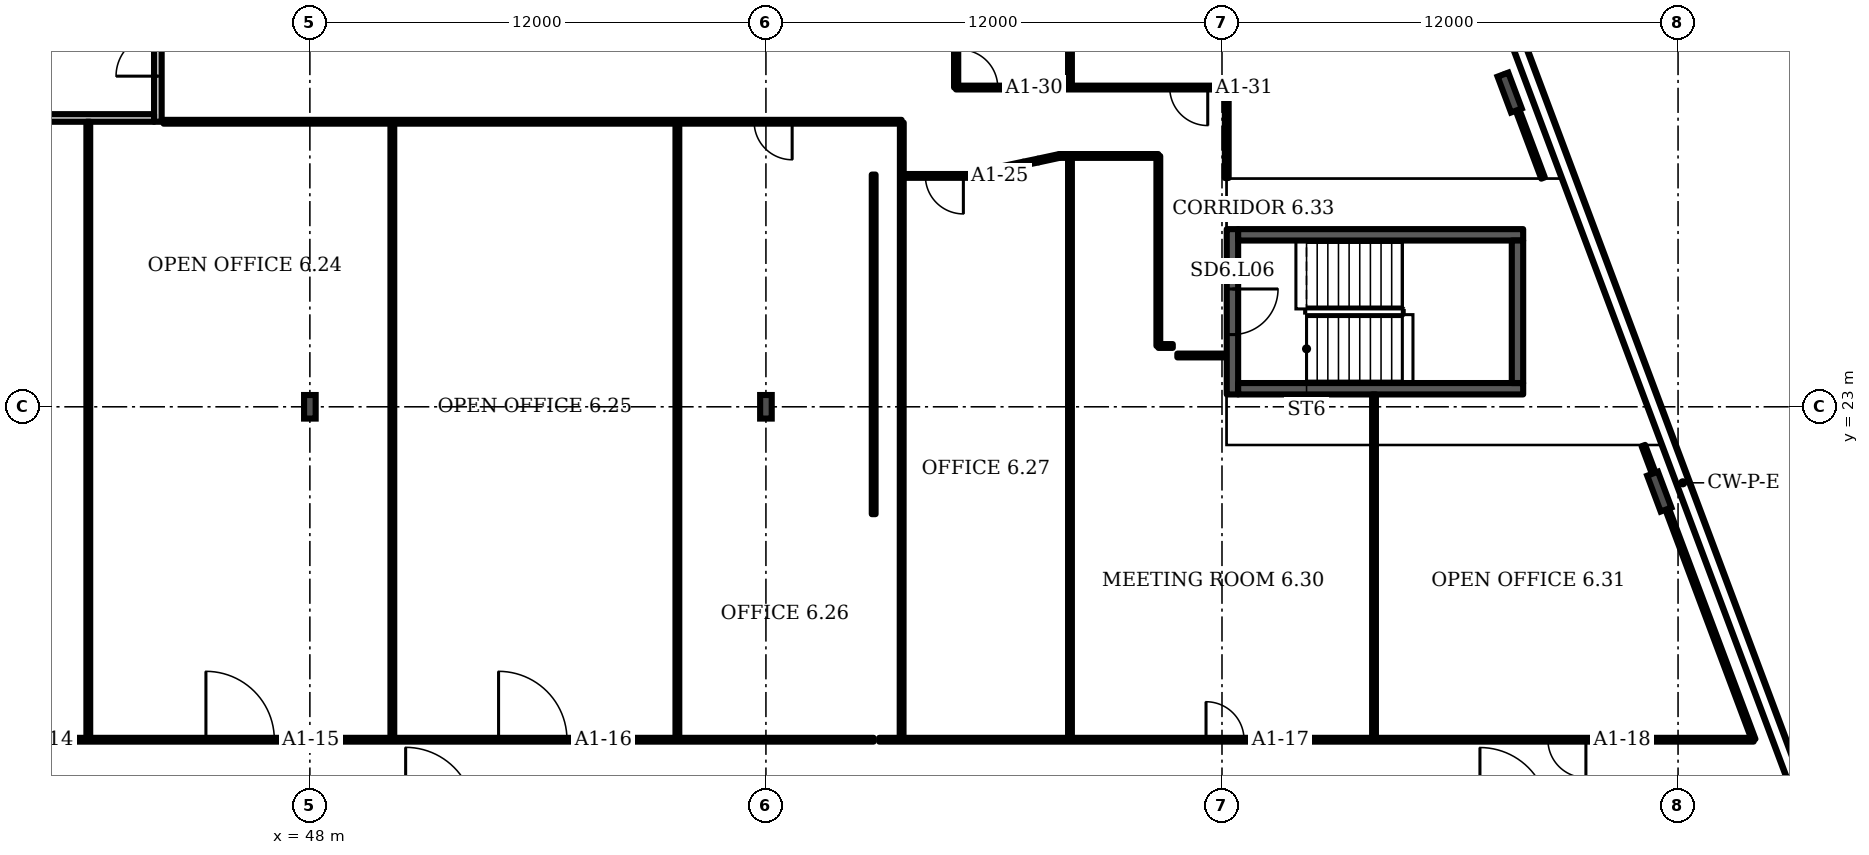
"""IFC4 building model, lengths in metres.
Left out: names, types, materials, properties, quantities, classifications, styles, units other than length and angle.
Written with IfcOpenShell. Run it as: python <this file> out.ifc"""

import sys

from ifc_helpers import new_model, si_unit, direction, frame, frame_2d, origin, origin_2d, place, context, subcontext, project, spatial, rectangle, i_section, extrude, element, fill, save


model = new_model("IFC4")
c1 = context("Model", 3, precision=1e-05, world=origin(), true_north=direction((0.0, 1.0)))
c2 = subcontext(c1, "Body", "Model", "MODEL_VIEW")
j1 = project(units=[si_unit("LENGTHUNIT", "METRE"), si_unit("PLANEANGLEUNIT", "RADIAN")], contexts=[c1])
p1 = place(None, origin())
s1 = spatial("IfcSite", under=j1, at=p1, CompositionType="ELEMENT")
p2 = place(p1, origin())
s2 = spatial("IfcBuilding", under=s1, at=p2, CompositionType="ELEMENT")
p3 = place(p2, frame((0.0, 0.0, 41.5)))
s3 = spatial("IfcBuildingStorey", under=s2, at=p3, CompositionType="ELEMENT", Elevation=41.5)
for number, where, z_axis, x_axis in (
    (1, (83.507, 20.768, 0.0), (0.0, 0.0, 1.0), (0.936, 0.351, 0.0)),
    (2, (79.57, 31.268, 0.0), (0.0, 0.0, 1.0), (0.936, 0.351, 0.0)),
):
    element("IfcColumn", number, at=place(p3, frame(where, z_axis=z_axis, x_axis=x_axis)), inside=s3, PredefinedType="COLUMN", context=c2, shape_type="SweptSolid", body=[
        extrude(i_section(OverallWidth=0.302, OverallDepth=1.008, WebThickness=0.021, FlangeThickness=0.04, FilletRadius=0.03, at=origin_2d()), origin(), (0.0, 0.0, 1.0), 3.6),
    ])
for number, where, z_axis, x_axis in (
    (3, (48.0, 23.0, 0.0), (0.0, 0.0, 1.0), (1.0, 0.0, 0.0)),
    (4, (60.0, 23.0, 0.0), (0.0, 0.0, 1.0), (1.0, 0.0, 0.0)),
):
    element("IfcColumn", number, at=place(p3, frame(where, z_axis=z_axis, x_axis=x_axis)), inside=s3, PredefinedType="COLUMN", context=c2, shape_type="SweptSolid", body=[
        extrude(i_section(OverallWidth=0.305, OverallDepth=0.62, WebThickness=0.021, FlangeThickness=0.04, FilletRadius=0.027, at=origin_2d()), origin(), (0.0, 0.0, 1.0), 3.6),
    ])
p4 = place(p3, frame((91.926, 0.211, 0.0), z_axis=(0.0, 0.0, 1.0), x_axis=(-0.351119, 0.93633, 0.0)))
e5 = element("IfcWall", 5, at=p4, inside=s3, PredefinedType="SOLIDWALL", context=c2, shape_type="SweptSolid", body=[
    extrude(rectangle(XDim=44.757, YDim=0.35, at=frame_2d((22.378, 0.0))), origin(), (0.0, 0.0, 1.0), 1.0),
])
p5 = place(p3, frame((44.0, 30.5, 0.0), z_axis=(0.0, 0.0, 1.0), x_axis=(0.0, 1.0, 0.0)))
e6 = element("IfcWall", 6, at=p5, inside=s3, PredefinedType="PARTITIONING", context=c2, shape_type="SweptSolid", body=[
    extrude(rectangle(XDim=3.5, YDim=0.2, at=frame_2d((1.75, 0.0))), origin(), (0.0, 0.0, 1.0), 3.2),
])
p6 = place(p5, frame((1.2, 0.0, 0.0)))
e7 = element("IfcOpeningElement", 7, at=p6, cuts=e6, PredefinedType="OPENING", context=c2, shape_type="SweptSolid", body=[
    extrude(rectangle(XDim=1.1, YDim=2.1, at=frame_2d((0.55, 1.05))), frame((0.0, 0.11, 0.0), z_axis=(0.0, -1.0, 0.0), x_axis=(1.0, 0.0, 0.0)), (0.0, 0.0, 1.0), 0.22),
])
p7 = place(p3, frame((41.1, 30.6, 0.0), z_axis=(0.0, 0.0, 1.0), x_axis=(1.0, 0.0, 0.0)))
e8 = element("IfcWall", 8, at=p7, inside=s3, PredefinedType="PARTITIONING", context=c2, shape_type="SweptSolid", body=[
    extrude(rectangle(XDim=2.8, YDim=0.2, at=frame_2d((1.4, 0.0))), origin(), (0.0, 0.0, 1.0), 3.2),
])
p8 = place(p3, frame((72.275, 23.325, 0.0), z_axis=(0.0, 0.0, 1.0), x_axis=(0.0, 1.0, 0.0)))
e9 = element("IfcWall", 9, at=p8, inside=s3, PredefinedType="SHEAR", context=c2, shape_type="SweptSolid", body=[
    extrude(rectangle(XDim=4.35, YDim=0.3, at=frame_2d((2.175, 0.0))), origin(), (0.0, 0.0, 1.0), 3.2),
])
p9 = place(p8, frame((1.575, 0.0, 0.0)))
e10 = element("IfcOpeningElement", 10, at=p9, cuts=e9, PredefinedType="OPENING", context=c2, shape_type="SweptSolid", body=[
    extrude(rectangle(XDim=1.2, YDim=2.1, at=frame_2d((0.6, 1.05))), frame((0.0, 0.16, 0.0), z_axis=(0.0, -1.0, 0.0), x_axis=(1.0, 0.0, 0.0)), (0.0, 0.0, 1.0), 0.32),
])
p10 = place(p3, frame((11.2, 14.24, 0.0), z_axis=(0.0, 0.0, 1.0), x_axis=(1.0, 0.0, 0.0)))
e11 = element("IfcWall", 11, at=p10, inside=s3, PredefinedType="PARTITIONING", context=c2, shape_type="SweptSolid", body=[
    extrude(rectangle(XDim=51.635, YDim=0.1, at=frame_2d((25.817, 0.0))), origin(), (0.0, 0.0, 1.0), 3.2),
])
p11 = place(p10, frame((0.115, 0.0, 0.0)))
e12 = element("IfcOpeningElement", 12, at=p11, cuts=e11, PredefinedType="OPENING", context=c2, shape_type="SweptSolid", body=[
    extrude(rectangle(XDim=1.0, YDim=2.1, at=frame_2d((0.5, 1.05))), frame((0.0, 0.06, 0.0), z_axis=(0.0, -1.0, 0.0), x_axis=(1.0, 0.0, 0.0)), (0.0, 0.0, 1.0), 0.12),
])
p12 = place(p10, frame((6.635, 0.0, 0.0)))
e13 = element("IfcOpeningElement", 13, at=p12, cuts=e11, PredefinedType="OPENING", context=c2, shape_type="SweptSolid", body=[
    extrude(rectangle(XDim=1.0, YDim=2.1, at=frame_2d((0.5, 1.05))), frame((0.0, 0.06, 0.0), z_axis=(0.0, -1.0, 0.0), x_axis=(1.0, 0.0, 0.0)), (0.0, 0.0, 1.0), 0.12),
])
p13 = place(p10, frame((22.7, 0.0, 0.0)))
e14 = element("IfcOpeningElement", 14, at=p13, cuts=e11, PredefinedType="OPENING", context=c2, shape_type="SweptSolid", body=[
    extrude(rectangle(XDim=1.0, YDim=2.1, at=frame_2d((0.5, 1.05))), frame((0.0, 0.06, 0.0), z_axis=(0.0, -1.0, 0.0), x_axis=(1.0, 0.0, 0.0)), (0.0, 0.0, 1.0), 0.12),
])
p14 = place(p10, frame((27.865, 0.0, 0.0)))
e15 = element("IfcOpeningElement", 15, at=p14, cuts=e11, PredefinedType="OPENING", context=c2, shape_type="SweptSolid", body=[
    extrude(rectangle(XDim=1.0, YDim=2.1, at=frame_2d((0.5, 1.05))), frame((0.0, 0.06, 0.0), z_axis=(0.0, -1.0, 0.0), x_axis=(1.0, 0.0, 0.0)), (0.0, 0.0, 1.0), 0.12),
])
p15 = place(p10, frame((34.065, 0.0, 0.0)))
e16 = element("IfcOpeningElement", 16, at=p15, cuts=e11, PredefinedType="OPENING", context=c2, shape_type="SweptSolid", body=[
    extrude(rectangle(XDim=1.8, YDim=2.1, at=frame_2d((0.9, 1.05))), frame((0.0, 0.06, 0.0), z_axis=(0.0, -1.0, 0.0), x_axis=(1.0, 0.0, 0.0)), (0.0, 0.0, 1.0), 0.12),
])
p16 = place(p10, frame((41.765, 0.0, 0.0)))
e17 = element("IfcOpeningElement", 17, at=p16, cuts=e11, PredefinedType="OPENING", context=c2, shape_type="SweptSolid", body=[
    extrude(rectangle(XDim=1.8, YDim=2.1, at=frame_2d((0.9, 1.05))), frame((0.0, 0.06, 0.0), z_axis=(0.0, -1.0, 0.0), x_axis=(1.0, 0.0, 0.0)), (0.0, 0.0, 1.0), 0.12),
])
for number, where, z_axis, x_axis in (
    (18, (42.17, 14.24, 0.0), (0.0, 0.0, 1.0), (0.0, 1.0, 0.0)),
    (19, (50.17, 14.24, 0.0), (0.0, 0.0, 1.0), (0.0, 1.0, 0.0)),
    (20, (57.67, 14.24, 0.0), (0.0, 0.0, 1.0), (0.0, 1.0, 0.0)),
):
    element("IfcWall", number, at=place(p3, frame(where, z_axis=z_axis, x_axis=x_axis)), inside=s3, PredefinedType="PARTITIONING", context=c2, shape_type="SweptSolid", body=[
        extrude(rectangle(XDim=16.26, YDim=0.1, at=frame_2d((8.13, 0.0))), origin(), (0.0, 0.0, 1.0), 3.2),
    ])
p17 = place(p3, frame((62.835, 20.175, 0.0), z_axis=(0.0, 0.0, 1.0), x_axis=(0.0, 1.0, 0.0)))
e21 = element("IfcWall", 21, at=p17, inside=s3, PredefinedType="PARTITIONING", context=c2, shape_type="SweptSolid", body=[
    extrude(rectangle(XDim=8.935, YDim=0.1, at=frame_2d((4.468, 0.0))), origin(), (0.0, 0.0, 1.0), 3.2),
])
p18 = place(p3, frame((62.98, 14.24, 0.0), z_axis=(0.0, 0.0, 1.0), x_axis=(1.0, 0.0, 0.0)))
e22 = element("IfcWall", 22, at=p18, inside=s3, PredefinedType="PARTITIONING", context=c2, shape_type="SweptSolid", body=[
    extrude(rectangle(XDim=23.01, YDim=0.1, at=frame_2d((11.505, 0.0))), origin(), (0.0, 0.0, 1.0), 3.2),
])
p19 = place(p18, frame((8.6, 0.0, 0.0)))
e23 = element("IfcOpeningElement", 23, at=p19, cuts=e22, PredefinedType="OPENING", context=c2, shape_type="SweptSolid", body=[
    extrude(rectangle(XDim=1.0, YDim=2.1, at=frame_2d((0.5, 1.05))), frame((0.0, 0.06, 0.0), z_axis=(0.0, -1.0, 0.0), x_axis=(1.0, 0.0, 0.0)), (0.0, 0.0, 1.0), 0.12),
])
p20 = place(p18, frame((17.595, 0.0, 0.0)))
e24 = element("IfcOpeningElement", 24, at=p20, cuts=e22, PredefinedType="OPENING", context=c2, shape_type="SweptSolid", body=[
    extrude(rectangle(XDim=1.0, YDim=2.1, at=frame_2d((0.5, 1.05))), frame((0.0, 0.06, 0.0), z_axis=(0.0, -1.0, 0.0), x_axis=(1.0, 0.0, 0.0)), (0.0, 0.0, 1.0), 0.12),
])
p21 = place(p3, frame((63.57, 14.245, 0.0), z_axis=(0.0, 0.0, 1.0), x_axis=(0.000331, 1.000002, 0.0)))
e25 = element("IfcWall", 25, at=p21, inside=s3, PredefinedType="PARTITIONING", context=c2, shape_type="SweptSolid", body=[
    extrude(rectangle(XDim=16.233, YDim=0.1, at=frame_2d((8.117, 0.0))), origin(), (0.0, 0.0, 1.0), 3.2),
])
p22 = place(p3, frame((63.575, 29.075, 0.0), z_axis=(0.0, 0.0, 1.0), x_axis=(1.0, 0.0, 0.0)))
e26 = element("IfcWall", 26, at=p22, inside=s3, PredefinedType="PARTITIONING", context=c2, shape_type="SweptSolid", body=[
    extrude(rectangle(XDim=2.08, YDim=0.1, at=frame_2d((1.04, 0.0))), origin(), (0.0, 0.0, 1.0), 3.2),
])
p23 = place(p22, frame((0.62, 0.0, 0.0)))
e27 = element("IfcOpeningElement", 27, at=p23, cuts=e26, PredefinedType="OPENING", context=c2, shape_type="SweptSolid", body=[
    extrude(rectangle(XDim=1.0, YDim=2.1, at=frame_2d((0.5, 1.05))), frame((0.0, 0.06, 0.0), z_axis=(0.0, -1.0, 0.0), x_axis=(1.0, 0.0, 0.0)), (0.0, 0.0, 1.0), 0.12),
])
p24 = place(p3, frame((65.0, 31.4, 0.0), z_axis=(0.0, 0.0, 1.0), x_axis=(0.0, 1.0, 0.0)))
e28 = element("IfcWall", 28, at=p24, inside=s3, PredefinedType="PARTITIONING", context=c2, shape_type="SweptSolid", body=[
    extrude(rectangle(XDim=2.58, YDim=0.1, at=frame_2d((1.29, 0.0))), origin(), (0.0, 0.0, 1.0), 3.2),
])
p25 = place(p3, frame((65.0, 31.4, 0.0), z_axis=(0.0, 0.0, 1.0), x_axis=(1.0, 0.0, 0.0)))
e29 = element("IfcWall", 29, at=p25, inside=s3, PredefinedType="PARTITIONING", context=c2, shape_type="SweptSolid", body=[
    extrude(rectangle(XDim=7.125, YDim=0.1, at=frame_2d((3.562, 0.0))), origin(), (0.0, 0.0, 1.0), 3.2),
])
p26 = place(p25, frame((0.1, 0.0, 0.0)))
e30 = element("IfcOpeningElement", 30, at=p26, cuts=e29, PredefinedType="OPENING", context=c2, shape_type="SweptSolid", body=[
    extrude(rectangle(XDim=1.0, YDim=2.1, at=frame_2d((0.5, 1.05))), frame((0.0, 0.06, 0.0), z_axis=(0.0, -1.0, 0.0), x_axis=(1.0, 0.0, 0.0)), (0.0, 0.0, 1.0), 0.12),
])
p27 = place(p25, frame((5.625, 0.0, 0.0)))
e31 = element("IfcOpeningElement", 31, at=p27, cuts=e29, PredefinedType="OPENING", context=c2, shape_type="SweptSolid", body=[
    extrude(rectangle(XDim=1.0, YDim=2.1, at=frame_2d((0.5, 1.05))), frame((0.0, 0.06, 0.0), z_axis=(0.0, -1.0, 0.0), x_axis=(1.0, 0.0, 0.0)), (0.0, 0.0, 1.0), 0.12),
])
p28 = place(p3, frame((65.655, 29.075, 0.0), z_axis=(0.0, 0.0, 1.0), x_axis=(0.671773, 0.740757, 0.0)))
e32 = element("IfcWall", 32, at=p28, inside=s3, PredefinedType="PARTITIONING", context=c2, shape_type="SweptSolid", body=[
    extrude(rectangle(XDim=0.149, YDim=0.1, at=frame_2d((0.074, 0.0))), origin(), (0.0, 0.0, 1.0), 3.2),
])
p29 = place(p3, frame((65.755, 29.185, 0.0), z_axis=(0.0, 0.0, 1.0), x_axis=(0.978739, 0.205118, 0.0)))
e33 = element("IfcWall", 33, at=p29, inside=s3, PredefinedType="PARTITIONING", context=c2, shape_type="SweptSolid", body=[
    extrude(rectangle(XDim=1.047, YDim=0.1, at=frame_2d((0.524, 0.0))), origin(), (0.0, 0.0, 1.0), 3.2),
])
p30 = place(p3, frame((66.78, 29.4, 0.0), z_axis=(0.0, 0.0, 1.0), x_axis=(0.979048, 0.203632, 0.0)))
e34 = element("IfcWall", 34, at=p30, inside=s3, PredefinedType="PARTITIONING", context=c2, shape_type="SweptSolid", body=[
    extrude(rectangle(XDim=0.393, YDim=0.1, at=frame_2d((0.197, 0.0))), origin(), (0.0, 0.0, 1.0), 3.2),
])
p31 = place(p3, frame((67.165, 29.48, 0.0), z_axis=(0.0, 0.0, 1.0), x_axis=(0.977367, 0.211555, 0.0)))
e35 = element("IfcWall", 35, at=p31, inside=s3, PredefinedType="PARTITIONING", context=c2, shape_type="SweptSolid", body=[
    extrude(rectangle(XDim=0.568, YDim=0.1, at=frame_2d((0.284, 0.0))), origin(), (0.0, 0.0, 1.0), 3.2),
])
p32 = place(p3, frame((67.72, 29.6, 0.0), z_axis=(0.0, 0.0, 1.0), x_axis=(1.0, 0.0, 0.0)))
e36 = element("IfcWall", 36, at=p32, inside=s3, PredefinedType="PARTITIONING", context=c2, shape_type="SweptSolid", body=[
    extrude(rectangle(XDim=2.605, YDim=0.1, at=frame_2d((1.302, 0.0))), origin(), (0.0, 0.0, 1.0), 3.2),
])
p33 = place(p3, frame((68.0, 14.24, 0.0), z_axis=(0.0, 0.0, 1.0), x_axis=(0.0, 1.0, 0.0)))
e37 = element("IfcWall", 37, at=p33, inside=s3, PredefinedType="PARTITIONING", context=c2, shape_type="SweptSolid", body=[
    extrude(rectangle(XDim=15.36, YDim=0.1, at=frame_2d((7.68, 0.0))), origin(), (0.0, 0.0, 1.0), 3.2),
])
p34 = place(p3, frame((68.0, 31.4, 0.0), z_axis=(0.0, 0.0, 1.0), x_axis=(0.0, 1.0, 0.0)))
e38 = element("IfcWall", 38, at=p34, inside=s3, PredefinedType="PARTITIONING", context=c2, shape_type="SweptSolid", body=[
    extrude(rectangle(XDim=8.39, YDim=0.1, at=frame_2d((4.195, 0.0))), origin(), (0.0, 0.0, 1.0), 3.2),
])
p35 = place(p3, frame((70.325, 24.6, 0.0), z_axis=(0.0, 0.0, 1.0), x_axis=(0.0, 1.0, 0.0)))
e39 = element("IfcWall", 39, at=p35, inside=s3, PredefinedType="PARTITIONING", context=c2, shape_type="SweptSolid", body=[
    extrude(rectangle(XDim=5.0, YDim=0.1, at=frame_2d((2.5, 0.0))), origin(), (0.0, 0.0, 1.0), 3.2),
])
p36 = place(p3, frame((70.325, 24.6, 0.0), z_axis=(0.0, 0.0, 1.0), x_axis=(1.0, 0.0, 0.0)))
e40 = element("IfcWall", 40, at=p36, inside=s3, PredefinedType="PARTITIONING", context=c2, shape_type="SweptSolid", body=[
    extrude(rectangle(XDim=0.38, YDim=0.1, at=frame_2d((0.19, 0.0))), origin(), (0.0, 0.0, 1.0), 3.2),
])
p37 = place(p3, frame((70.825, 24.35, 0.0), z_axis=(0.0, 0.0, 1.0), x_axis=(1.0, 0.0, 0.0)))
e41 = element("IfcWall", 41, at=p37, inside=s3, PredefinedType="PARTITIONING", context=c2, shape_type="SweptSolid", body=[
    extrude(rectangle(XDim=1.28, YDim=0.1, at=frame_2d((0.64, 0.0))), origin(), (0.0, 0.0, 1.0), 3.2),
])
p38 = place(p3, frame((72.125, 29.02, 0.0), z_axis=(0.0, 0.0, 1.0), x_axis=(0.0, 1.0, 0.0)))
e42 = element("IfcWall", 42, at=p38, inside=s3, PredefinedType="PARTITIONING", context=c2, shape_type="SweptSolid", body=[
    extrude(rectangle(XDim=2.38, YDim=0.1, at=frame_2d((1.19, 0.0))), origin(), (0.0, 0.0, 1.0), 3.2),
])
p39 = place(p3, frame((76.0, 14.24, 0.0), z_axis=(0.0, 0.0, 1.0), x_axis=(0.0, 1.0, 0.0)))
e43 = element("IfcWall", 43, at=p39, inside=s3, PredefinedType="PARTITIONING", context=c2, shape_type="SweptSolid", body=[
    extrude(rectangle(XDim=9.085, YDim=0.1, at=frame_2d((4.542, 0.0))), origin(), (0.0, 0.0, 1.0), 3.2),
])
p40 = place(p3, frame((80.448, 29.02, 0.0), z_axis=(0.0, 0.0, 1.0), x_axis=(-0.35129, 0.93627, 0.0)))
e44 = element("IfcWall", 44, at=p40, inside=s3, PredefinedType="PARTITIONING", context=c2, shape_type="SweptSolid", body=[
    extrude(rectangle(XDim=2.911, YDim=0.1, at=frame_2d((1.455, 0.0))), origin(), (0.0, 0.0, 1.0), 2.58),
])
p41 = place(p3, frame((85.99, 14.24, 0.0), z_axis=(0.0, 0.0, 1.0), x_axis=(-0.351133, 0.936325, 0.0)))
e45 = element("IfcWall", 45, at=p41, inside=s3, PredefinedType="PARTITIONING", context=c2, shape_type="SweptSolid", body=[
    extrude(rectangle(XDim=8.266, YDim=0.1, at=frame_2d((4.133, 0.0))), origin(), (0.0, 0.0, 1.0), 2.58),
])
p42 = place(p3, frame((44.15, 30.5, 0.0), z_axis=(0.0, 0.0, 1.0), x_axis=(1.0, 0.0, 0.0)))
e46 = element("IfcWall", 46, at=p42, inside=s3, PredefinedType="PARTITIONING", context=c2, shape_type="SweptSolid", body=[
    extrude(rectangle(XDim=19.42, YDim=0.1, at=frame_2d((9.71, 0.0))), origin(), (0.0, 0.0, 1.0), 3.2),
])
p43 = place(p42, frame((15.54, 0.0, 0.0)))
e47 = element("IfcOpeningElement", 47, at=p43, cuts=e46, PredefinedType="OPENING", context=c2, shape_type="SweptSolid", body=[
    extrude(rectangle(XDim=1.0, YDim=2.1, at=frame_2d((0.5, 1.05))), frame((0.0, 0.06, 0.0), z_axis=(0.0, -1.0, 0.0), x_axis=(1.0, 0.0, 0.0)), (0.0, 0.0, 1.0), 0.12),
])
for number, where, z_axis, x_axis in (
    (48, (72.425, 23.475, 0.0), (0.0, 0.0, 1.0), (1.0, 0.0, 0.0)),
    (49, (72.425, 27.525, 0.0), (0.0, 0.0, 1.0), (1.0, 0.0, 0.0)),
):
    element("IfcWall", number, at=place(p3, frame(where, z_axis=z_axis, x_axis=x_axis)), inside=s3, PredefinedType="SHEAR", context=c2, shape_type="SweptSolid", body=[
        extrude(rectangle(XDim=7.5, YDim=0.3, at=frame_2d((3.75, 0.0))), origin(), (0.0, 0.0, 1.0), 3.2),
    ])
p44 = place(p3, frame((79.775, 23.625, 0.0), z_axis=(0.0, 0.0, 1.0), x_axis=(0.0, 1.0, 0.0)))
e50 = element("IfcWall", 50, at=p44, inside=s3, PredefinedType="SHEAR", context=c2, shape_type="SweptSolid", body=[
    extrude(rectangle(XDim=3.75, YDim=0.3, at=frame_2d((1.875, 0.0))), origin(), (0.0, 0.0, 1.0), 3.2),
])
p45 = place(p6, origin())
e51 = element("IfcDoor", 51, at=p45, inside=s3, OperationType="SINGLE_SWING_LEFT", PredefinedType="DOOR", context=c2, shape_type="SweptSolid", body=[
    extrude(rectangle(XDim=1.1, YDim=2.1, at=frame_2d((0.55, 1.05))), frame((0.0, 0.025, 0.0), z_axis=(0.0, -1.0, 0.0), x_axis=(1.0, 0.0, 0.0)), (0.0, 0.0, 1.0), 0.05),
])
fill(e7, e51)
p46 = place(p9, origin())
e52 = element("IfcDoor", 52, at=p46, inside=s3, OperationType="SINGLE_SWING_RIGHT", PredefinedType="DOOR", context=c2, shape_type="SweptSolid", body=[
    extrude(rectangle(XDim=1.2, YDim=2.1, at=frame_2d((0.6, 1.05))), frame((0.0, 0.025, 0.0), z_axis=(0.0, -1.0, 0.0), x_axis=(1.0, 0.0, 0.0)), (0.0, 0.0, 1.0), 0.05),
])
fill(e10, e52)
p47 = place(p15, origin())
e53 = element("IfcDoor", 53, at=p47, inside=s3, OperationType="DOUBLE_DOOR_SINGLE_SWING", PredefinedType="DOOR", context=c2, shape_type="SweptSolid", body=[
    extrude(rectangle(XDim=1.8, YDim=2.1, at=frame_2d((0.9, 1.05))), frame((0.0, 0.025, 0.0), z_axis=(0.0, -1.0, 0.0), x_axis=(1.0, 0.0, 0.0)), (0.0, 0.0, 1.0), 0.05),
])
fill(e16, e53)
p48 = place(p16, origin())
e54 = element("IfcDoor", 54, at=p48, inside=s3, OperationType="DOUBLE_DOOR_SINGLE_SWING", PredefinedType="DOOR", context=c2, shape_type="SweptSolid", body=[
    extrude(rectangle(XDim=1.8, YDim=2.1, at=frame_2d((0.9, 1.05))), frame((0.0, 0.025, 0.0), z_axis=(0.0, -1.0, 0.0), x_axis=(1.0, 0.0, 0.0)), (0.0, 0.0, 1.0), 0.05),
])
fill(e17, e54)
p49 = place(p19, origin())
e55 = element("IfcDoor", 55, at=p49, inside=s3, OperationType="SINGLE_SWING_LEFT", PredefinedType="DOOR", context=c2, shape_type="SweptSolid", body=[
    extrude(rectangle(XDim=1.0, YDim=2.1, at=frame_2d((0.5, 1.05))), frame((0.0, 0.025, 0.0), z_axis=(0.0, -1.0, 0.0), x_axis=(1.0, 0.0, 0.0)), (0.0, 0.0, 1.0), 0.05),
])
fill(e23, e55)
p50 = place(p20, origin())
e56 = element("IfcDoor", 56, at=p50, inside=s3, OperationType="SINGLE_SWING_RIGHT", PredefinedType="DOOR", context=c2, shape_type="SweptSolid", body=[
    extrude(rectangle(XDim=1.0, YDim=2.1, at=frame_2d((0.5, 1.05))), frame((0.0, 0.025, 0.0), z_axis=(0.0, -1.0, 0.0), x_axis=(1.0, 0.0, 0.0)), (0.0, 0.0, 1.0), 0.05),
])
fill(e24, e56)
p51 = place(p23, origin())
e57 = element("IfcDoor", 57, at=p51, inside=s3, OperationType="SINGLE_SWING_RIGHT", PredefinedType="DOOR", context=c2, shape_type="SweptSolid", body=[
    extrude(rectangle(XDim=1.0, YDim=2.1, at=frame_2d((0.5, 1.05))), frame((0.0, 0.025, 0.0), z_axis=(0.0, -1.0, 0.0), x_axis=(1.0, 0.0, 0.0)), (0.0, 0.0, 1.0), 0.05),
])
fill(e27, e57)
p52 = place(p43, origin())
e58 = element("IfcDoor", 58, at=p52, inside=s3, OperationType="SINGLE_SWING_RIGHT", PredefinedType="DOOR", context=c2, shape_type="SweptSolid", body=[
    extrude(rectangle(XDim=1.0, YDim=2.1, at=frame_2d((0.5, 1.05))), frame((0.0, 0.025, 0.0), z_axis=(0.0, -1.0, 0.0), x_axis=(1.0, 0.0, 0.0)), (0.0, 0.0, 1.0), 0.05),
])
fill(e47, e58)
p53 = place(p26, origin())
e59 = element("IfcDoor", 59, at=p53, inside=s3, OperationType="SINGLE_SWING_LEFT", PredefinedType="DOOR", context=c2, shape_type="SweptSolid", body=[
    extrude(rectangle(XDim=1.0, YDim=2.1, at=frame_2d((0.5, 1.05))), frame((0.0, 0.025, 0.0), z_axis=(0.0, -1.0, 0.0), x_axis=(1.0, 0.0, 0.0)), (0.0, 0.0, 1.0), 0.05),
])
fill(e30, e59)
p54 = place(p27, origin())
e60 = element("IfcDoor", 60, at=p54, inside=s3, OperationType="SINGLE_SWING_RIGHT", PredefinedType="DOOR", context=c2, shape_type="SweptSolid", body=[
    extrude(rectangle(XDim=1.0, YDim=2.1, at=frame_2d((0.5, 1.05))), frame((0.0, 0.025, 0.0), z_axis=(0.0, -1.0, 0.0), x_axis=(1.0, 0.0, 0.0)), (0.0, 0.0, 1.0), 0.05),
])
fill(e31, e60)
save(model, sys.argv[1])
